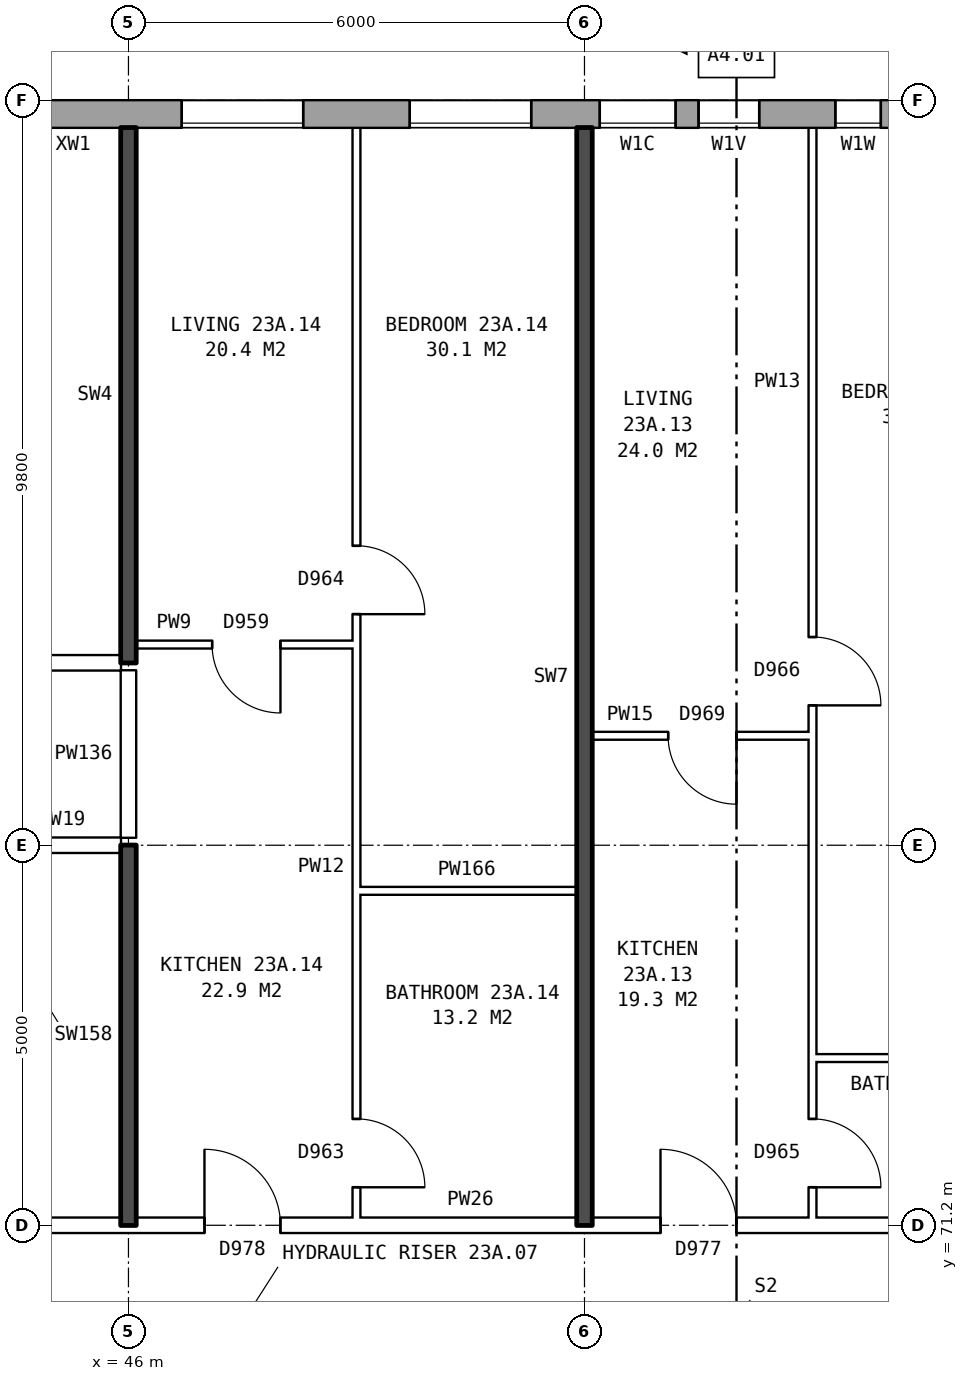
"""IFC4 building model, lengths in metres.
Left out: names, types, materials, properties, quantities, classifications, styles, units other than length and angle.
Written with IfcOpenShell. Run it as: python <this file> out.ifc"""

import sys

from ifc_helpers import new_model, si_unit, direction, frame, frame_2d, origin, place, context, subcontext, project, spatial, rectangle, extrude, element, fill, save


model = new_model("IFC4")
c1 = context("Model", 3, precision=1e-05, world=origin(), true_north=direction((0.0, 1.0)))
c2 = subcontext(c1, "Body", "Model", "MODEL_VIEW")
j1 = project(units=[si_unit("LENGTHUNIT", "METRE"), si_unit("PLANEANGLEUNIT", "RADIAN")], contexts=[c1])
p1 = place(None, origin())
s1 = spatial("IfcSite", under=j1, at=p1, CompositionType="ELEMENT")
p2 = place(p1, origin())
s2 = spatial("IfcBuilding", under=s1, at=p2, CompositionType="ELEMENT")
p3 = place(p2, frame((0.0, 0.0, 84.0)))
s3 = spatial("IfcBuildingStorey", under=s2, at=p3, CompositionType="ELEMENT", Elevation=84.0)
p4 = place(p3, frame((72.925, 85.82, 0.0), z_axis=(0.0, 0.0, 1.0), x_axis=(-1.0, 0.0, 0.0)))
e1 = element("IfcWall", 1, at=p4, inside=s3, PredefinedType="STANDARD", context=c2, shape_type="SweptSolid", body=[
    extrude(rectangle(XDim=46.601, YDim=0.36, at=frame_2d((23.3, 0.0))), origin(), (0.0, 0.0, 1.0), 2.85),
])
p5 = place(p4, frame((0.625, 0.0, 0.8)))
e2 = element("IfcOpeningElement", 2, at=p5, cuts=e1, PredefinedType="OPENING", context=c2, shape_type="SweptSolid", body=[
    extrude(rectangle(XDim=1.6, YDim=1.8, at=frame_2d((0.8, 0.9))), frame((0.0, 0.19, 0.0), z_axis=(0.0, -1.0, 0.0), x_axis=(1.0, 0.0, 0.0)), (0.0, 0.0, 1.0), 0.38),
])
p6 = place(p4, frame((3.625, 0.0, 0.8)))
e3 = element("IfcOpeningElement", 3, at=p6, cuts=e1, PredefinedType="OPENING", context=c2, shape_type="SweptSolid", body=[
    extrude(rectangle(XDim=1.6, YDim=1.8, at=frame_2d((0.8, 0.9))), frame((0.0, 0.19, 0.0), z_axis=(0.0, -1.0, 0.0), x_axis=(1.0, 0.0, 0.0)), (0.0, 0.0, 1.0), 0.38),
])
p7 = place(p4, frame((6.625, 0.0, 0.8)))
e4 = element("IfcOpeningElement", 4, at=p7, cuts=e1, PredefinedType="OPENING", context=c2, shape_type="SweptSolid", body=[
    extrude(rectangle(XDim=1.6, YDim=1.8, at=frame_2d((0.8, 0.9))), frame((0.0, 0.19, 0.0), z_axis=(0.0, -1.0, 0.0), x_axis=(1.0, 0.0, 0.0)), (0.0, 0.0, 1.0), 0.38),
])
p8 = place(p4, frame((9.625, 0.0, 0.8)))
e5 = element("IfcOpeningElement", 5, at=p8, cuts=e1, PredefinedType="OPENING", context=c2, shape_type="SweptSolid", body=[
    extrude(rectangle(XDim=1.6, YDim=1.8, at=frame_2d((0.8, 0.9))), frame((0.0, 0.19, 0.0), z_axis=(0.0, -1.0, 0.0), x_axis=(1.0, 0.0, 0.0)), (0.0, 0.0, 1.0), 0.38),
])
p9 = place(p4, frame((12.625, 0.0, 0.8)))
e6 = element("IfcOpeningElement", 6, at=p9, cuts=e1, PredefinedType="OPENING", context=c2, shape_type="SweptSolid", body=[
    extrude(rectangle(XDim=1.6, YDim=1.8, at=frame_2d((0.8, 0.9))), frame((0.0, 0.19, 0.0), z_axis=(0.0, -1.0, 0.0), x_axis=(1.0, 0.0, 0.0)), (0.0, 0.0, 1.0), 0.38),
])
p10 = place(p4, frame((15.125, 0.0, 0.8)))
e7 = element("IfcOpeningElement", 7, at=p10, cuts=e1, PredefinedType="OPENING", context=c2, shape_type="SweptSolid", body=[
    extrude(rectangle(XDim=1.6, YDim=1.8, at=frame_2d((0.8, 0.9))), frame((0.0, 0.19, 0.0), z_axis=(0.0, -1.0, 0.0), x_axis=(1.0, 0.0, 0.0)), (0.0, 0.0, 1.0), 0.38),
])
p11 = place(p4, frame((18.625, 0.0, 0.35)))
e8 = element("IfcOpeningElement", 8, at=p11, cuts=e1, PredefinedType="OPENING", context=c2, shape_type="SweptSolid", body=[
    extrude(rectangle(XDim=0.8, YDim=0.9, at=frame_2d((0.4, 0.45))), frame((0.0, 0.19, 0.0), z_axis=(0.0, -1.0, 0.0), x_axis=(1.0, 0.0, 0.0)), (0.0, 0.0, 1.0), 0.38),
])
p12 = place(p4, frame((21.625, 0.0, 0.8)))
e9 = element("IfcOpeningElement", 9, at=p12, cuts=e1, PredefinedType="OPENING", context=c2, shape_type="SweptSolid", body=[
    extrude(rectangle(XDim=1.6, YDim=1.8, at=frame_2d((0.8, 0.9))), frame((0.0, 0.19, 0.0), z_axis=(0.0, -1.0, 0.0), x_axis=(1.0, 0.0, 0.0)), (0.0, 0.0, 1.0), 0.38),
])
p13 = place(p4, frame((24.625, 0.0, 0.8)))
e10 = element("IfcOpeningElement", 10, at=p13, cuts=e1, PredefinedType="OPENING", context=c2, shape_type="SweptSolid", body=[
    extrude(rectangle(XDim=1.6, YDim=1.8, at=frame_2d((0.8, 0.9))), frame((0.0, 0.19, 0.0), z_axis=(0.0, -1.0, 0.0), x_axis=(1.0, 0.0, 0.0)), (0.0, 0.0, 1.0), 0.38),
])
p14 = place(p4, frame((29.075, 0.0, 1.4)))
e11 = element("IfcOpeningElement", 11, at=p14, cuts=e1, PredefinedType="OPENING", context=c2, shape_type="SweptSolid", body=[
    extrude(rectangle(XDim=1.2, YDim=1.2, at=frame_2d((0.6, 0.6))), frame((0.0, 0.19, 0.0), z_axis=(0.0, -1.0, 0.0), x_axis=(1.0, 0.0, 0.0)), (0.0, 0.0, 1.0), 0.38),
])
p15 = place(p4, frame((30.625, 0.0, 0.8)))
e12 = element("IfcOpeningElement", 12, at=p15, cuts=e1, PredefinedType="OPENING", context=c2, shape_type="SweptSolid", body=[
    extrude(rectangle(XDim=1.6, YDim=1.8, at=frame_2d((0.8, 0.9))), frame((0.0, 0.19, 0.0), z_axis=(0.0, -1.0, 0.0), x_axis=(1.0, 0.0, 0.0)), (0.0, 0.0, 1.0), 0.38),
])
p16 = place(p4, frame((33.625, 0.0, 0.8)))
e13 = element("IfcOpeningElement", 13, at=p16, cuts=e1, PredefinedType="OPENING", context=c2, shape_type="SweptSolid", body=[
    extrude(rectangle(XDim=1.6, YDim=1.8, at=frame_2d((0.8, 0.9))), frame((0.0, 0.19, 0.0), z_axis=(0.0, -1.0, 0.0), x_axis=(1.0, 0.0, 0.0)), (0.0, 0.0, 1.0), 0.38),
])
p17 = place(p4, frame((36.625, 0.0, 0.8)))
e14 = element("IfcOpeningElement", 14, at=p17, cuts=e1, PredefinedType="OPENING", context=c2, shape_type="SweptSolid", body=[
    extrude(rectangle(XDim=1.6, YDim=1.8, at=frame_2d((0.8, 0.9))), frame((0.0, 0.19, 0.0), z_axis=(0.0, -1.0, 0.0), x_axis=(1.0, 0.0, 0.0)), (0.0, 0.0, 1.0), 0.38),
])
p18 = place(p4, frame((39.625, 0.0, 0.8)))
e15 = element("IfcOpeningElement", 15, at=p18, cuts=e1, PredefinedType="OPENING", context=c2, shape_type="SweptSolid", body=[
    extrude(rectangle(XDim=1.6, YDim=1.8, at=frame_2d((0.8, 0.9))), frame((0.0, 0.19, 0.0), z_axis=(0.0, -1.0, 0.0), x_axis=(1.0, 0.0, 0.0)), (0.0, 0.0, 1.0), 0.38),
])
p19 = place(p4, frame((42.625, 0.0, 0.8)))
e16 = element("IfcOpeningElement", 16, at=p19, cuts=e1, PredefinedType="OPENING", context=c2, shape_type="SweptSolid", body=[
    extrude(rectangle(XDim=1.6, YDim=1.8, at=frame_2d((0.8, 0.9))), frame((0.0, 0.19, 0.0), z_axis=(0.0, -1.0, 0.0), x_axis=(1.0, 0.0, 0.0)), (0.0, 0.0, 1.0), 0.38),
])
p20 = place(p4, frame((17.025, 0.0, 1.5)))
e17 = element("IfcOpeningElement", 17, at=p20, cuts=e1, PredefinedType="OPENING", context=c2, shape_type="SweptSolid", body=[
    extrude(rectangle(XDim=0.6, YDim=0.9, at=frame_2d((0.3, 0.45))), frame((0.0, 0.19, 0.0), z_axis=(0.0, -1.0, 0.0), x_axis=(1.0, 0.0, 0.0)), (0.0, 0.0, 1.0), 0.38),
])
p21 = place(p4, frame((19.725, 0.0, 0.35)))
e18 = element("IfcOpeningElement", 18, at=p21, cuts=e1, PredefinedType="OPENING", context=c2, shape_type="SweptSolid", body=[
    extrude(rectangle(XDim=1.0, YDim=1.8, at=frame_2d((0.5, 0.9))), frame((0.0, 0.19, 0.0), z_axis=(0.0, -1.0, 0.0), x_axis=(1.0, 0.0, 0.0)), (0.0, 0.0, 1.0), 0.38),
])
p22 = place(p3, frame((44.36, 71.2, 0.0), z_axis=(0.0, 0.0, 1.0), x_axis=(1.0, 0.0, 0.0)))
e19 = element("IfcWall", 19, at=p22, inside=s3, PredefinedType="PARTITIONING", context=c2, shape_type="SweptSolid", body=[
    extrude(rectangle(XDim=19.28, YDim=0.2, at=frame_2d((9.64, 0.0))), origin(), (0.0, 0.0, 1.0), 2.85),
])
p23 = place(p22, frame((14.64, 0.0, 0.0)))
e20 = element("IfcOpeningElement", 20, at=p23, cuts=e19, PredefinedType="OPENING", context=c2, shape_type="SweptSolid", body=[
    extrude(rectangle(XDim=1.0, YDim=2.1, at=frame_2d((0.5, 1.05))), frame((0.0, 0.11, 0.0), z_axis=(0.0, -1.0, 0.0), x_axis=(1.0, 0.0, 0.0)), (0.0, 0.0, 1.0), 0.22),
])
p24 = place(p22, frame((8.64, 0.0, 0.0)))
e21 = element("IfcOpeningElement", 21, at=p24, cuts=e19, PredefinedType="OPENING", context=c2, shape_type="SweptSolid", body=[
    extrude(rectangle(XDim=1.0, YDim=2.1, at=frame_2d((0.5, 1.05))), frame((0.0, 0.11, 0.0), z_axis=(0.0, -1.0, 0.0), x_axis=(1.0, 0.0, 0.0)), (0.0, 0.0, 1.0), 0.22),
])
p25 = place(p22, frame((2.64, 0.0, 0.0)))
e22 = element("IfcOpeningElement", 22, at=p25, cuts=e19, PredefinedType="OPENING", context=c2, shape_type="SweptSolid", body=[
    extrude(rectangle(XDim=1.0, YDim=2.1, at=frame_2d((0.5, 1.05))), frame((0.0, 0.11, 0.0), z_axis=(0.0, -1.0, 0.0), x_axis=(1.0, 0.0, 0.0)), (0.0, 0.0, 1.0), 0.22),
])
for number, where, z_axis, x_axis in (
    (23, (55.0, 73.4, 0.0), (0.0, 0.0, 1.0), (1.0, 0.0, 0.0)),
    (24, (49.0, 75.6, 0.0), (0.0, 0.0, 1.0), (1.0, 0.0, 0.0)),
):
    element("IfcWall", number, at=place(p3, frame(where, z_axis=z_axis, x_axis=x_axis)), inside=s3, PredefinedType="PARTITIONING", context=c2, shape_type="SweptSolid", body=[
        extrude(rectangle(XDim=2.9, YDim=0.1, at=frame_2d((1.45, 0.0))), origin(), (0.0, 0.0, 1.0), 2.85),
    ])
p26 = place(p3, frame((44.36, 76.2, 0.0), z_axis=(0.0, 0.0, 1.0), x_axis=(1.0, 0.0, 0.0)))
e25 = element("IfcWall", 25, at=p26, inside=s3, PredefinedType="PARTITIONING", context=c2, shape_type="SweptSolid", body=[
    extrude(rectangle(XDim=1.54, YDim=0.2, at=frame_2d((0.77, 0.0))), origin(), (0.0, 0.0, 1.0), 2.85),
])
p27 = place(p3, frame((52.1, 77.64, 0.0), z_axis=(0.0, 0.0, 1.0), x_axis=(1.0, 0.0, 0.0)))
e26 = element("IfcWall", 26, at=p27, inside=s3, PredefinedType="PARTITIONING", context=c2, shape_type="SweptSolid", body=[
    extrude(rectangle(XDim=2.9, YDim=0.1, at=frame_2d((1.45, 0.0))), origin(), (0.0, 0.0, 1.0), 2.85),
])
p28 = place(p27, frame((1.0, 0.0, 0.0)))
e27 = element("IfcOpeningElement", 27, at=p28, cuts=e26, PredefinedType="OPENING", context=c2, shape_type="SweptSolid", body=[
    extrude(rectangle(XDim=0.9, YDim=2.1, at=frame_2d((0.45, 1.05))), frame((0.0, 0.06, 0.0), z_axis=(0.0, -1.0, 0.0), x_axis=(1.0, 0.0, 0.0)), (0.0, 0.0, 1.0), 0.12),
])
p29 = place(p3, frame((23.61, 78.6, 0.0), z_axis=(0.0, 0.0, 1.0), x_axis=(1.0, 0.0, 0.0)))
e28 = element("IfcWall", 28, at=p29, inside=s3, PredefinedType="PARTITIONING", context=c2, shape_type="SweptSolid", body=[
    extrude(rectangle(XDim=22.29, YDim=0.2, at=frame_2d((11.145, 0.0))), origin(), (0.0, 0.0, 1.0), 2.85),
])
p30 = place(p29, frame((18.84, 0.0, 0.0)))
e29 = element("IfcOpeningElement", 29, at=p30, cuts=e28, PredefinedType="OPENING", context=c2, shape_type="SweptSolid", body=[
    extrude(rectangle(XDim=1.0, YDim=2.1, at=frame_2d((0.5, 1.05))), frame((0.0, 0.11, 0.0), z_axis=(0.0, -1.0, 0.0), x_axis=(1.0, 0.0, 0.0)), (0.0, 0.0, 1.0), 0.22),
])
p31 = place(p29, frame((6.89, 0.0, 0.0)))
e30 = element("IfcOpeningElement", 30, at=p31, cuts=e28, PredefinedType="OPENING", context=c2, shape_type="SweptSolid", body=[
    extrude(rectangle(XDim=1.0, YDim=2.1, at=frame_2d((0.5, 1.05))), frame((0.0, 0.11, 0.0), z_axis=(0.0, -1.0, 0.0), x_axis=(1.0, 0.0, 0.0)), (0.0, 0.0, 1.0), 0.22),
])
p32 = place(p3, frame((46.1, 78.84, 0.0), z_axis=(0.0, 0.0, 1.0), x_axis=(1.0, 0.0, 0.0)))
e31 = element("IfcWall", 31, at=p32, inside=s3, PredefinedType="PARTITIONING", context=c2, shape_type="SweptSolid", body=[
    extrude(rectangle(XDim=2.9, YDim=0.1, at=frame_2d((1.45, 0.0))), origin(), (0.0, 0.0, 1.0), 2.85),
])
p33 = place(p32, frame((1.0, 0.0, 0.0)))
e32 = element("IfcOpeningElement", 32, at=p33, cuts=e31, PredefinedType="OPENING", context=c2, shape_type="SweptSolid", body=[
    extrude(rectangle(XDim=0.9, YDim=2.1, at=frame_2d((0.45, 1.05))), frame((0.0, 0.06, 0.0), z_axis=(0.0, -1.0, 0.0), x_axis=(1.0, 0.0, 0.0)), (0.0, 0.0, 1.0), 0.12),
])
p34 = place(p3, frame((46.0, 71.2, 0.0), z_axis=(0.0, 0.0, 1.0), x_axis=(0.0, 1.0, 0.0)))
e33 = element("IfcWall", 33, at=p34, inside=s3, PredefinedType="SOLIDWALL", context=c2, shape_type="SweptSolid", body=[
    extrude(rectangle(XDim=5.0, YDim=0.2, at=frame_2d((2.5, 0.0))), origin(), (0.0, 0.0, 1.0), 2.85),
])
p35 = place(p3, frame((46.0, 76.3, 0.0), z_axis=(0.0, 0.0, 1.0), x_axis=(0.0, 1.0, 0.0)))
e34 = element("IfcWall", 34, at=p35, inside=s3, PredefinedType="PARTITIONING", context=c2, shape_type="SweptSolid", body=[
    extrude(rectangle(XDim=2.2, YDim=0.2, at=frame_2d((1.1, 0.0))), origin(), (0.0, 0.0, 1.0), 2.85),
])
p36 = place(p3, frame((46.0, 78.6, 0.0), z_axis=(0.0, 0.0, 1.0), x_axis=(0.0, 1.0, 0.0)))
e35 = element("IfcWall", 35, at=p36, inside=s3, PredefinedType="SOLIDWALL", context=c2, shape_type="SweptSolid", body=[
    extrude(rectangle(XDim=7.04, YDim=0.2, at=frame_2d((3.52, 0.0))), origin(), (0.0, 0.0, 1.0), 2.85),
])
p37 = place(p3, frame((49.0, 71.3, 0.0), z_axis=(0.0, 0.0, 1.0), x_axis=(0.0, 1.0, 0.0)))
e36 = element("IfcWall", 36, at=p37, inside=s3, PredefinedType="PARTITIONING", context=c2, shape_type="SweptSolid", body=[
    extrude(rectangle(XDim=14.34, YDim=0.1, at=frame_2d((7.17, 0.0))), origin(), (0.0, 0.0, 1.0), 2.85),
])
p38 = place(p37, frame((7.94, 0.0, 0.0)))
e37 = element("IfcOpeningElement", 37, at=p38, cuts=e36, PredefinedType="OPENING", context=c2, shape_type="SweptSolid", body=[
    extrude(rectangle(XDim=0.9, YDim=2.1, at=frame_2d((0.45, 1.05))), frame((0.0, 0.06, 0.0), z_axis=(0.0, -1.0, 0.0), x_axis=(1.0, 0.0, 0.0)), (0.0, 0.0, 1.0), 0.12),
])
p39 = place(p37, frame((0.4, 0.0, 0.0)))
e38 = element("IfcOpeningElement", 38, at=p39, cuts=e36, PredefinedType="OPENING", context=c2, shape_type="SweptSolid", body=[
    extrude(rectangle(XDim=0.9, YDim=2.1, at=frame_2d((0.45, 1.05))), frame((0.0, 0.06, 0.0), z_axis=(0.0, -1.0, 0.0), x_axis=(1.0, 0.0, 0.0)), (0.0, 0.0, 1.0), 0.12),
])
p40 = place(p3, frame((52.0, 71.2, 0.0), z_axis=(0.0, 0.0, 1.0), x_axis=(0.0, 1.0, 0.0)))
e39 = element("IfcWall", 39, at=p40, inside=s3, PredefinedType="SOLIDWALL", context=c2, shape_type="SweptSolid", body=[
    extrude(rectangle(XDim=14.44, YDim=0.2, at=frame_2d((7.22, 0.0))), origin(), (0.0, 0.0, 1.0), 2.85),
])
p41 = place(p3, frame((55.0, 71.3, 0.0), z_axis=(0.0, 0.0, 1.0), x_axis=(0.0, 1.0, 0.0)))
e40 = element("IfcWall", 40, at=p41, inside=s3, PredefinedType="PARTITIONING", context=c2, shape_type="SweptSolid", body=[
    extrude(rectangle(XDim=14.34, YDim=0.1, at=frame_2d((7.17, 0.0))), origin(), (0.0, 0.0, 1.0), 2.85),
])
p42 = place(p41, frame((6.74, 0.0, 0.0)))
e41 = element("IfcOpeningElement", 41, at=p42, cuts=e40, PredefinedType="OPENING", context=c2, shape_type="SweptSolid", body=[
    extrude(rectangle(XDim=0.9, YDim=2.1, at=frame_2d((0.45, 1.05))), frame((0.0, 0.06, 0.0), z_axis=(0.0, -1.0, 0.0), x_axis=(1.0, 0.0, 0.0)), (0.0, 0.0, 1.0), 0.12),
])
p43 = place(p41, frame((0.4, 0.0, 0.0)))
e42 = element("IfcOpeningElement", 42, at=p43, cuts=e40, PredefinedType="OPENING", context=c2, shape_type="SweptSolid", body=[
    extrude(rectangle(XDim=0.9, YDim=2.1, at=frame_2d((0.45, 1.05))), frame((0.0, 0.06, 0.0), z_axis=(0.0, -1.0, 0.0), x_axis=(1.0, 0.0, 0.0)), (0.0, 0.0, 1.0), 0.12),
])
p44 = place(p11, origin())
e43 = element("IfcWindow", 43, at=p44, inside=s3, PartitioningType="SINGLE_PANEL", PredefinedType="WINDOW", context=c2, shape_type="SweptSolid", body=[
    extrude(rectangle(XDim=0.8, YDim=0.9, at=frame_2d((0.4, 0.45))), frame((0.0, 0.15, 0.0), z_axis=(0.0, -1.0, 0.0), x_axis=(1.0, 0.0, 0.0)), (0.0, 0.0, 1.0), 0.06),
])
fill(e8, e43)
p45 = place(p12, origin())
e44 = element("IfcWindow", 44, at=p45, inside=s3, PartitioningType="SINGLE_PANEL", PredefinedType="WINDOW", context=c2, shape_type="SweptSolid", body=[
    extrude(rectangle(XDim=1.6, YDim=1.8, at=frame_2d((0.8, 0.9))), frame((0.0, 0.15, 0.0), z_axis=(0.0, -1.0, 0.0), x_axis=(1.0, 0.0, 0.0)), (0.0, 0.0, 1.0), 0.06),
])
fill(e9, e44)
p46 = place(p13, origin())
e45 = element("IfcWindow", 45, at=p46, inside=s3, PartitioningType="SINGLE_PANEL", PredefinedType="WINDOW", context=c2, shape_type="SweptSolid", body=[
    extrude(rectangle(XDim=1.6, YDim=1.8, at=frame_2d((0.8, 0.9))), frame((0.0, 0.15, 0.0), z_axis=(0.0, -1.0, 0.0), x_axis=(1.0, 0.0, 0.0)), (0.0, 0.0, 1.0), 0.06),
])
fill(e10, e45)
p47 = place(p42, frame((0.9, 0.0, 0.0), z_axis=(0.0, 0.0, 1.0), x_axis=(-1.0, 0.0, 0.0)))
e46 = element("IfcDoor", 46, at=p47, inside=s3, OperationType="SINGLE_SWING_RIGHT", PredefinedType="DOOR", context=c2, shape_type="SweptSolid", body=[
    extrude(rectangle(XDim=0.9, YDim=2.1, at=frame_2d((0.45, 1.05))), frame((0.0, 0.025, 0.0), z_axis=(0.0, -1.0, 0.0), x_axis=(1.0, 0.0, 0.0)), (0.0, 0.0, 1.0), 0.05),
])
fill(e41, e46)
p48 = place(p24, origin())
e47 = element("IfcDoor", 47, at=p48, inside=s3, OperationType="SINGLE_SWING_LEFT", PredefinedType="DOOR", context=c2, shape_type="SweptSolid", body=[
    extrude(rectangle(XDim=1.0, YDim=2.1, at=frame_2d((0.5, 1.05))), frame((0.0, 0.025, 0.0), z_axis=(0.0, -1.0, 0.0), x_axis=(1.0, 0.0, 0.0)), (0.0, 0.0, 1.0), 0.05),
])
fill(e21, e47)
p49 = place(p28, frame((0.9, 0.0, 0.0), z_axis=(0.0, 0.0, 1.0), x_axis=(-1.0, 0.0, 0.0)))
e48 = element("IfcDoor", 48, at=p49, inside=s3, OperationType="SINGLE_SWING_LEFT", PredefinedType="DOOR", context=c2, shape_type="SweptSolid", body=[
    extrude(rectangle(XDim=0.9, YDim=2.1, at=frame_2d((0.45, 1.05))), frame((0.0, 0.025, 0.0), z_axis=(0.0, -1.0, 0.0), x_axis=(1.0, 0.0, 0.0)), (0.0, 0.0, 1.0), 0.05),
])
fill(e27, e48)
p50 = place(p43, frame((0.9, 0.0, 0.0), z_axis=(0.0, 0.0, 1.0), x_axis=(-1.0, 0.0, 0.0)))
e49 = element("IfcDoor", 49, at=p50, inside=s3, OperationType="SINGLE_SWING_RIGHT", PredefinedType="DOOR", context=c2, shape_type="SweptSolid", body=[
    extrude(rectangle(XDim=0.9, YDim=2.1, at=frame_2d((0.45, 1.05))), frame((0.0, 0.025, 0.0), z_axis=(0.0, -1.0, 0.0), x_axis=(1.0, 0.0, 0.0)), (0.0, 0.0, 1.0), 0.05),
])
fill(e42, e49)
p51 = place(p38, frame((0.9, 0.0, 0.0), z_axis=(0.0, 0.0, 1.0), x_axis=(-1.0, 0.0, 0.0)))
e50 = element("IfcDoor", 50, at=p51, inside=s3, OperationType="SINGLE_SWING_RIGHT", PredefinedType="DOOR", context=c2, shape_type="SweptSolid", body=[
    extrude(rectangle(XDim=0.9, YDim=2.1, at=frame_2d((0.45, 1.05))), frame((0.0, 0.025, 0.0), z_axis=(0.0, -1.0, 0.0), x_axis=(1.0, 0.0, 0.0)), (0.0, 0.0, 1.0), 0.05),
])
fill(e37, e50)
p52 = place(p25, origin())
e51 = element("IfcDoor", 51, at=p52, inside=s3, OperationType="SINGLE_SWING_LEFT", PredefinedType="DOOR", context=c2, shape_type="SweptSolid", body=[
    extrude(rectangle(XDim=1.0, YDim=2.1, at=frame_2d((0.5, 1.05))), frame((0.0, 0.025, 0.0), z_axis=(0.0, -1.0, 0.0), x_axis=(1.0, 0.0, 0.0)), (0.0, 0.0, 1.0), 0.05),
])
fill(e22, e51)
p53 = place(p33, frame((0.9, 0.0, 0.0), z_axis=(0.0, 0.0, 1.0), x_axis=(-1.0, 0.0, 0.0)))
e52 = element("IfcDoor", 52, at=p53, inside=s3, OperationType="SINGLE_SWING_LEFT", PredefinedType="DOOR", context=c2, shape_type="SweptSolid", body=[
    extrude(rectangle(XDim=0.9, YDim=2.1, at=frame_2d((0.45, 1.05))), frame((0.0, 0.025, 0.0), z_axis=(0.0, -1.0, 0.0), x_axis=(1.0, 0.0, 0.0)), (0.0, 0.0, 1.0), 0.05),
])
fill(e32, e52)
p54 = place(p39, frame((0.9, 0.0, 0.0), z_axis=(0.0, 0.0, 1.0), x_axis=(-1.0, 0.0, 0.0)))
e53 = element("IfcDoor", 53, at=p54, inside=s3, OperationType="SINGLE_SWING_RIGHT", PredefinedType="DOOR", context=c2, shape_type="SweptSolid", body=[
    extrude(rectangle(XDim=0.9, YDim=2.1, at=frame_2d((0.45, 1.05))), frame((0.0, 0.025, 0.0), z_axis=(0.0, -1.0, 0.0), x_axis=(1.0, 0.0, 0.0)), (0.0, 0.0, 1.0), 0.05),
])
fill(e38, e53)
p55 = place(p20, origin())
e54 = element("IfcWindow", 54, at=p55, inside=s3, PartitioningType="SINGLE_PANEL", PredefinedType="WINDOW", context=c2, shape_type="SweptSolid", body=[
    extrude(rectangle(XDim=0.6, YDim=0.9, at=frame_2d((0.3, 0.45))), frame((0.0, 0.15, 0.0), z_axis=(0.0, -1.0, 0.0), x_axis=(1.0, 0.0, 0.0)), (0.0, 0.0, 1.0), 0.06),
])
fill(e17, e54)
p56 = place(p21, origin())
e55 = element("IfcWindow", 55, at=p56, inside=s3, PartitioningType="SINGLE_PANEL", PredefinedType="WINDOW", context=c2, shape_type="SweptSolid", body=[
    extrude(rectangle(XDim=1.0, YDim=1.8, at=frame_2d((0.5, 0.9))), frame((0.0, 0.15, 0.0), z_axis=(0.0, -1.0, 0.0), x_axis=(1.0, 0.0, 0.0)), (0.0, 0.0, 1.0), 0.06),
])
fill(e18, e55)
save(model, sys.argv[1])
